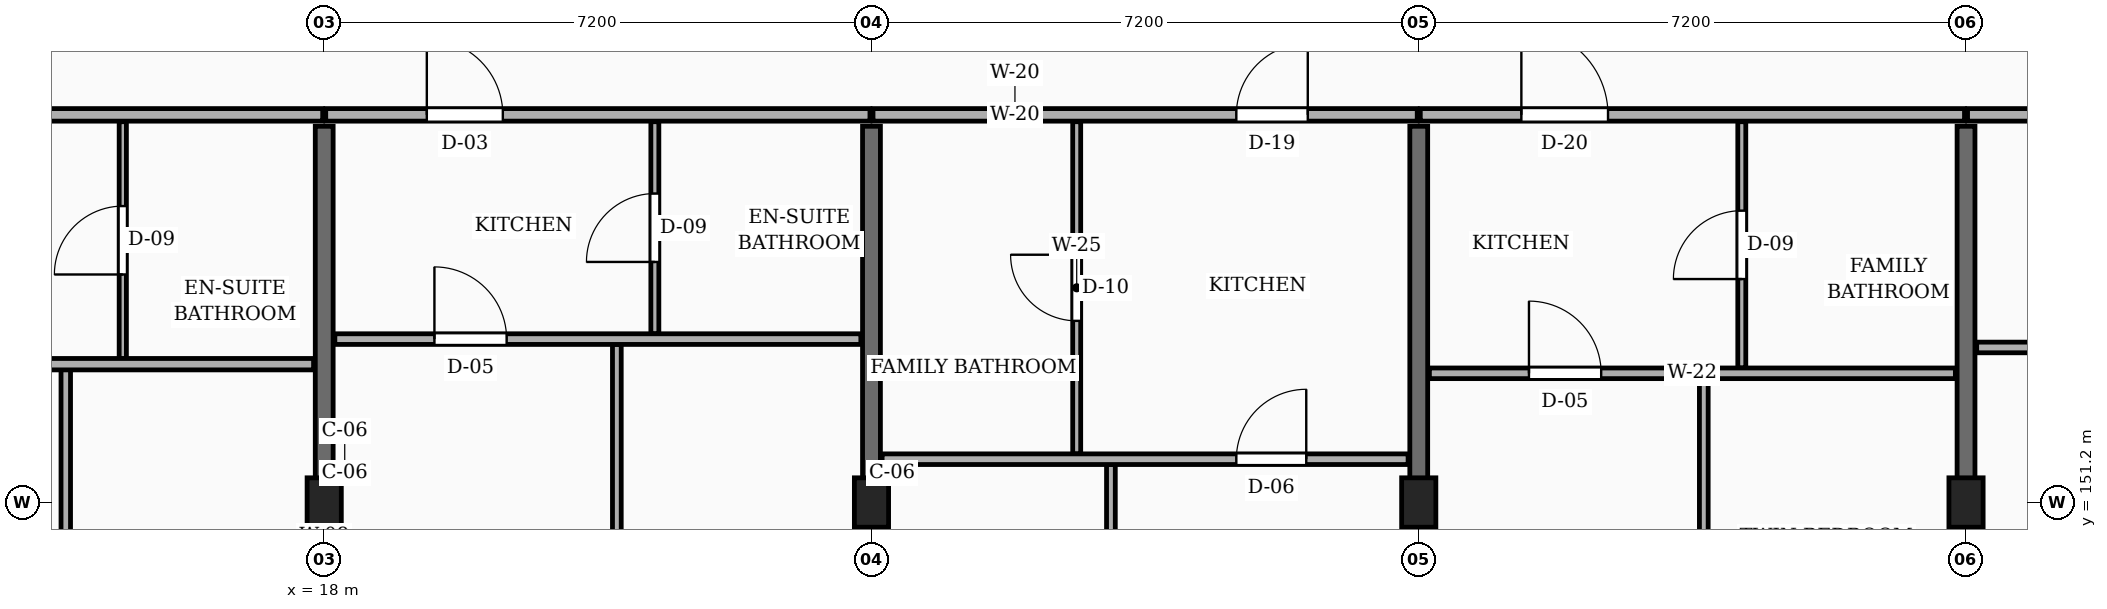
"""IFC4 building model, lengths in metres.
Left out: names, types, materials, properties, quantities, classifications, styles, units other than length and angle.
Written with IfcOpenShell. Run it as: python <this file> out.ifc"""

import sys

from ifc_helpers import new_model, si_unit, direction, frame, frame_2d, origin, origin_2d, place, context, subcontext, project, spatial, rectangle, extrude, element, fill, save


model = new_model("IFC4")
c1 = context("Model", 3, precision=1e-05, world=origin(), true_north=direction((0.0, 1.0)))
c2 = subcontext(c1, "Body", "Model", "MODEL_VIEW")
j1 = project(units=[si_unit("LENGTHUNIT", "METRE"), si_unit("PLANEANGLEUNIT", "RADIAN")], contexts=[c1])
p1 = place(None, origin())
s1 = spatial("IfcSite", under=j1, at=p1, CompositionType="ELEMENT")
p2 = place(p1, origin())
s2 = spatial("IfcBuilding", under=s1, at=p2, CompositionType="ELEMENT")
p3 = place(p2, frame((0.0, 0.0, 13.95)))
s3 = spatial("IfcBuildingStorey", under=s2, at=p3, CompositionType="ELEMENT", Elevation=13.95)
for number, where, z_axis, x_axis in (
    (1, (18.0, 151.2, 0.0), (0.0, 0.0, 1.0), (1.0, 0.0, 0.0)),
    (2, (25.2, 151.2, 0.0), (0.0, 0.0, 1.0), (1.0, 0.0, 0.0)),
    (3, (32.4, 151.2, 0.0), (0.0, 0.0, 1.0), (1.0, 0.0, 0.0)),
    (4, (39.6, 151.2, 0.0), (0.0, 0.0, 1.0), (1.0, 0.0, 0.0)),
):
    element("IfcColumn", number, at=place(p3, frame(where, z_axis=z_axis, x_axis=x_axis)), inside=s3, PredefinedType="COLUMN", context=c2, shape_type="SweptSolid", body=[
        extrude(rectangle(XDim=0.45, YDim=0.65, at=origin_2d()), origin(), (0.0, 0.0, 1.0), 3.15),
    ])
for number, where, z_axis, x_axis in (
    (5, (18.0, 144.275, 0.0), (0.0, 0.0, 1.0), (0.0, 1.0, 0.0)),
    (6, (25.2, 144.275, 0.0), (0.0, 0.0, 1.0), (0.0, 1.0, 0.0)),
    (7, (32.4, 144.275, 0.0), (0.0, 0.0, 1.0), (0.0, 1.0, 0.0)),
    (8, (39.6, 144.275, 0.0), (0.0, 0.0, 1.0), (0.0, 1.0, 0.0)),
):
    element("IfcWall", number, at=place(p3, frame(where, z_axis=z_axis, x_axis=x_axis)), inside=s3, PredefinedType="SOLIDWALL", context=c2, shape_type="SweptSolid", body=[
        extrude(rectangle(XDim=11.875, YDim=0.235, at=frame_2d((5.938, 0.0))), origin(), (0.0, 0.0, 1.0), 2.185),
    ])
p4 = place(p3, frame((10.975, 156.3, 0.0), z_axis=(0.0, 0.0, 1.0), x_axis=(1.0, 0.0, 0.0)))
e9 = element("IfcWall", 9, at=p4, inside=s3, PredefinedType="PARTITIONING", context=c2, shape_type="SweptSolid", body=[
    extrude(rectangle(XDim=7.005, YDim=0.165, at=frame_2d((3.502, 0.0))), origin(), (0.0, 0.0, 1.0), 2.32),
])
p5 = place(p4, frame((1.175, 0.0, 0.0)))
e10 = element("IfcOpeningElement", 10, at=p5, cuts=e9, PredefinedType="OPENING", context=c2, shape_type="SweptSolid", body=[
    extrude(rectangle(XDim=1.14, YDim=2.18, at=frame_2d((0.57, 1.09))), frame((0.0, 0.093, 0.0), z_axis=(0.0, -1.0, 0.0), x_axis=(1.0, 0.0, 0.0)), (0.0, 0.0, 1.0), 0.185),
])
p6 = place(p3, frame((18.02, 156.3, 0.0), z_axis=(0.0, 0.0, 1.0), x_axis=(1.0, 0.0, 0.0)))
e11 = element("IfcWall", 11, at=p6, inside=s3, PredefinedType="PARTITIONING", context=c2, shape_type="SweptSolid", body=[
    extrude(rectangle(XDim=7.16, YDim=0.165, at=frame_2d((3.58, 0.0))), origin(), (0.0, 0.0, 1.0), 2.32),
])
p7 = place(p6, frame((1.33, 0.0, 0.0)))
e12 = element("IfcOpeningElement", 12, at=p7, cuts=e11, PredefinedType="OPENING", context=c2, shape_type="SweptSolid", body=[
    extrude(rectangle(XDim=1.0, YDim=2.15, at=frame_2d((0.5, 1.075))), frame((0.0, 0.093, 0.0), z_axis=(0.0, -1.0, 0.0), x_axis=(1.0, 0.0, 0.0)), (0.0, 0.0, 1.0), 0.185),
])
p8 = place(p3, frame((25.22, 156.3, 0.0), z_axis=(0.0, 0.0, 1.0), x_axis=(1.0, 0.0, 0.0)))
e13 = element("IfcWall", 13, at=p8, inside=s3, PredefinedType="PARTITIONING", context=c2, shape_type="SweptSolid", body=[
    extrude(rectangle(XDim=7.16, YDim=0.165, at=frame_2d((3.58, 0.0))), origin(), (0.0, 0.0, 1.0), 2.32),
])
p9 = place(p8, frame((4.78, 0.0, 0.0)))
e14 = element("IfcOpeningElement", 14, at=p9, cuts=e13, PredefinedType="OPENING", context=c2, shape_type="SweptSolid", body=[
    extrude(rectangle(XDim=0.94, YDim=2.12, at=frame_2d((0.47, 1.06))), frame((0.0, 0.093, 0.0), z_axis=(0.0, -1.0, 0.0), x_axis=(1.0, 0.0, 0.0)), (0.0, 0.0, 1.0), 0.185),
])
p10 = place(p3, frame((32.42, 156.3, 0.0), z_axis=(0.0, 0.0, 1.0), x_axis=(1.0, 0.0, 0.0)))
e15 = element("IfcWall", 15, at=p10, inside=s3, PredefinedType="PARTITIONING", context=c2, shape_type="SweptSolid", body=[
    extrude(rectangle(XDim=7.16, YDim=0.165, at=frame_2d((3.58, 0.0))), origin(), (0.0, 0.0, 1.0), 2.32),
])
p11 = place(p10, frame((1.33, 0.0, 0.0)))
e16 = element("IfcOpeningElement", 16, at=p11, cuts=e15, PredefinedType="OPENING", context=c2, shape_type="SweptSolid", body=[
    extrude(rectangle(XDim=1.14, YDim=2.18, at=frame_2d((0.57, 1.09))), frame((0.0, 0.093, 0.0), z_axis=(0.0, -1.0, 0.0), x_axis=(1.0, 0.0, 0.0)), (0.0, 0.0, 1.0), 0.185),
])
p12 = place(p3, frame((39.62, 156.3, 0.0), z_axis=(0.0, 0.0, 1.0), x_axis=(1.0, 0.0, 0.0)))
e17 = element("IfcWall", 17, at=p12, inside=s3, PredefinedType="PARTITIONING", context=c2, shape_type="SweptSolid", body=[
    extrude(rectangle(XDim=7.16, YDim=0.165, at=frame_2d((3.58, 0.0))), origin(), (0.0, 0.0, 1.0), 2.32),
])
p13 = place(p12, frame((1.33, 0.0, 0.0)))
e18 = element("IfcOpeningElement", 18, at=p13, cuts=e17, PredefinedType="OPENING", context=c2, shape_type="SweptSolid", body=[
    extrude(rectangle(XDim=1.0, YDim=2.15, at=frame_2d((0.5, 1.075))), frame((0.0, 0.093, 0.0), z_axis=(0.0, -1.0, 0.0), x_axis=(1.0, 0.0, 0.0)), (0.0, 0.0, 1.0), 0.185),
])
p14 = place(p3, frame((14.6, 144.175, 0.0), z_axis=(0.0, 0.0, 1.0), x_axis=(0.0, 1.0, 0.0)))
e19 = element("IfcWall", 19, at=p14, inside=s3, PredefinedType="PARTITIONING", context=c2, shape_type="SweptSolid", body=[
    extrude(rectangle(XDim=8.775, YDim=0.125, at=frame_2d((4.387, 0.0))), origin(), (0.0, 0.0, 1.0), 2.32),
])
p15 = place(p14, frame((3.938, 0.0, 0.0)))
e20 = element("IfcOpeningElement", 20, at=p15, cuts=e19, PredefinedType="OPENING", context=c2, shape_type="SweptSolid", body=[
    extrude(rectangle(XDim=0.9, YDim=2.1, at=frame_2d((0.45, 1.05))), frame((0.0, 0.073, 0.0), z_axis=(0.0, -1.0, 0.0), x_axis=(1.0, 0.0, 0.0)), (0.0, 0.0, 1.0), 0.145),
])
p16 = place(p3, frame((15.35, 153.09, 0.0), z_axis=(0.0, 0.0, 1.0), x_axis=(0.0, 1.0, 0.0)))
e21 = element("IfcWall", 21, at=p16, inside=s3, PredefinedType="PARTITIONING", context=c2, shape_type="SweptSolid", body=[
    extrude(rectangle(XDim=3.12, YDim=0.095, at=frame_2d((1.56, 0.0))), origin(), (0.0, 0.0, 1.0), 2.32),
])
p17 = place(p16, frame((1.11, 0.0, 0.0)))
e22 = element("IfcOpeningElement", 22, at=p17, cuts=e21, PredefinedType="OPENING", context=c2, shape_type="SweptSolid", body=[
    extrude(rectangle(XDim=0.9, YDim=2.05, at=frame_2d((0.45, 1.025))), frame((0.0, 0.058, 0.0), z_axis=(0.0, -1.0, 0.0), x_axis=(1.0, 0.0, 0.0)), (0.0, 0.0, 1.0), 0.115),
])
p18 = place(p3, frame((10.975, 153.02, 0.0), z_axis=(0.0, 0.0, 1.0), x_axis=(1.0, 0.0, 0.0)))
e23 = element("IfcWall", 23, at=p18, inside=s3, PredefinedType="PARTITIONING", context=c2, shape_type="SweptSolid", body=[
    extrude(rectangle(XDim=6.885, YDim=0.15, at=frame_2d((3.442, 0.0))), origin(), (0.0, 0.0, 1.0), 2.32),
])
p19 = place(p18, frame((1.275, 0.0, 0.0)))
e24 = element("IfcOpeningElement", 24, at=p19, cuts=e23, PredefinedType="OPENING", context=c2, shape_type="SweptSolid", body=[
    extrude(rectangle(XDim=0.95, YDim=2.1, at=frame_2d((0.475, 1.05))), frame((0.0, 0.085, 0.0), z_axis=(0.0, -1.0, 0.0), x_axis=(1.0, 0.0, 0.0)), (0.0, 0.0, 1.0), 0.17),
])
p20 = place(p3, frame((21.85, 144.175, 0.0), z_axis=(0.0, 0.0, 1.0), x_axis=(0.0, 1.0, 0.0)))
e25 = element("IfcWall", 25, at=p20, inside=s3, PredefinedType="PARTITIONING", context=c2, shape_type="SweptSolid", body=[
    extrude(rectangle(XDim=9.105, YDim=0.115, at=frame_2d((4.552, 0.0))), origin(), (0.0, 0.0, 1.0), 2.32),
])
p21 = place(p20, frame((4.103, 0.0, 0.0)))
e26 = element("IfcOpeningElement", 26, at=p21, cuts=e25, PredefinedType="OPENING", context=c2, shape_type="SweptSolid", body=[
    extrude(rectangle(XDim=0.9, YDim=2.1, at=frame_2d((0.45, 1.05))), frame((0.0, 0.067, 0.0), z_axis=(0.0, -1.0, 0.0), x_axis=(1.0, 0.0, 0.0)), (0.0, 0.0, 1.0), 0.135),
])
p22 = place(p3, frame((22.35, 153.42, 0.0), z_axis=(0.0, 0.0, 1.0), x_axis=(0.0, 1.0, 0.0)))
e27 = element("IfcWall", 27, at=p22, inside=s3, PredefinedType="PARTITIONING", context=c2, shape_type="SweptSolid", body=[
    extrude(rectangle(XDim=2.79, YDim=0.105, at=frame_2d((1.395, 0.0))), origin(), (0.0, 0.0, 1.0), 2.32),
])
p23 = place(p22, frame((0.945, 0.0, 0.0)))
e28 = element("IfcOpeningElement", 28, at=p23, cuts=e27, PredefinedType="OPENING", context=c2, shape_type="SweptSolid", body=[
    extrude(rectangle(XDim=0.9, YDim=2.05, at=frame_2d((0.45, 1.025))), frame((0.0, 0.062, 0.0), z_axis=(0.0, -1.0, 0.0), x_axis=(1.0, 0.0, 0.0)), (0.0, 0.0, 1.0), 0.125),
])
p24 = place(p3, frame((18.14, 153.35, 0.0), z_axis=(0.0, 0.0, 1.0), x_axis=(1.0, 0.0, 0.0)))
e29 = element("IfcWall", 29, at=p24, inside=s3, PredefinedType="PARTITIONING", context=c2, shape_type="SweptSolid", body=[
    extrude(rectangle(XDim=6.92, YDim=0.14, at=frame_2d((3.46, 0.0))), origin(), (0.0, 0.0, 1.0), 2.32),
])
p25 = place(p24, frame((1.31, 0.0, 0.0)))
e30 = element("IfcOpeningElement", 30, at=p25, cuts=e29, PredefinedType="OPENING", context=c2, shape_type="SweptSolid", body=[
    extrude(rectangle(XDim=0.95, YDim=2.1, at=frame_2d((0.475, 1.05))), frame((0.0, 0.08, 0.0), z_axis=(0.0, -1.0, 0.0), x_axis=(1.0, 0.0, 0.0)), (0.0, 0.0, 1.0), 0.16),
])
p26 = place(p3, frame((28.35, 144.175, 0.0), z_axis=(0.0, 0.0, 1.0), x_axis=(0.0, 1.0, 0.0)))
e31 = element("IfcWall", 31, at=p26, inside=s3, PredefinedType="PARTITIONING", context=c2, shape_type="SweptSolid", body=[
    extrude(rectangle(XDim=7.525, YDim=0.115, at=frame_2d((3.762, 0.0))), origin(), (0.0, 0.0, 1.0), 2.32),
])
p27 = place(p26, frame((3.323, 0.0, 0.0)))
e32 = element("IfcOpeningElement", 32, at=p27, cuts=e31, PredefinedType="OPENING", context=c2, shape_type="SweptSolid", body=[
    extrude(rectangle(XDim=0.88, YDim=2.08, at=frame_2d((0.44, 1.04))), frame((0.0, 0.067, 0.0), z_axis=(0.0, -1.0, 0.0), x_axis=(1.0, 0.0, 0.0)), (0.0, 0.0, 1.0), 0.135),
])
p28 = place(p3, frame((27.9, 151.84, 0.0), z_axis=(0.0, 0.0, 1.0), x_axis=(0.0, 1.0, 0.0)))
e33 = element("IfcWall", 33, at=p28, inside=s3, PredefinedType="PARTITIONING", context=c2, shape_type="SweptSolid", body=[
    extrude(rectangle(XDim=4.37, YDim=0.105, at=frame_2d((2.185, 0.0))), origin(), (0.0, 0.0, 1.0), 2.32),
])
p29 = place(p28, frame((1.75, 0.0, 0.0)))
e34 = element("IfcOpeningElement", 34, at=p29, cuts=e33, PredefinedType="OPENING", context=c2, shape_type="SweptSolid", body=[
    extrude(rectangle(XDim=0.87, YDim=2.05, at=frame_2d((0.435, 1.025))), frame((0.0, 0.062, 0.0), z_axis=(0.0, -1.0, 0.0), x_axis=(1.0, 0.0, 0.0)), (0.0, 0.0, 1.0), 0.125),
])
p30 = place(p3, frame((25.34, 151.77, 0.0), z_axis=(0.0, 0.0, 1.0), x_axis=(1.0, 0.0, 0.0)))
e35 = element("IfcWall", 35, at=p30, inside=s3, PredefinedType="PARTITIONING", context=c2, shape_type="SweptSolid", body=[
    extrude(rectangle(XDim=6.92, YDim=0.14, at=frame_2d((3.46, 0.0))), origin(), (0.0, 0.0, 1.0), 2.32),
])
p31 = place(p30, frame((4.66, 0.0, 0.0)))
e36 = element("IfcOpeningElement", 36, at=p31, cuts=e35, PredefinedType="OPENING", context=c2, shape_type="SweptSolid", body=[
    extrude(rectangle(XDim=0.92, YDim=2.1, at=frame_2d((0.46, 1.05))), frame((0.0, 0.08, 0.0), z_axis=(0.0, -1.0, 0.0), x_axis=(1.0, 0.0, 0.0)), (0.0, 0.0, 1.0), 0.16),
])
p32 = place(p3, frame((36.15, 144.175, 0.0), z_axis=(0.0, 0.0, 1.0), x_axis=(0.0, 1.0, 0.0)))
e37 = element("IfcWall", 37, at=p32, inside=s3, PredefinedType="PARTITIONING", context=c2, shape_type="SweptSolid", body=[
    extrude(rectangle(XDim=8.655, YDim=0.115, at=frame_2d((4.328, 0.0))), origin(), (0.0, 0.0, 1.0), 2.32),
])
p33 = place(p32, frame((3.877, 0.0, 0.0)))
e38 = element("IfcOpeningElement", 38, at=p33, cuts=e37, PredefinedType="OPENING", context=c2, shape_type="SweptSolid", body=[
    extrude(rectangle(XDim=0.9, YDim=2.1, at=frame_2d((0.45, 1.05))), frame((0.0, 0.067, 0.0), z_axis=(0.0, -1.0, 0.0), x_axis=(1.0, 0.0, 0.0)), (0.0, 0.0, 1.0), 0.135),
])
p34 = place(p3, frame((36.65, 152.97, 0.0), z_axis=(0.0, 0.0, 1.0), x_axis=(0.0, 1.0, 0.0)))
e39 = element("IfcWall", 39, at=p34, inside=s3, PredefinedType="PARTITIONING", context=c2, shape_type="SweptSolid", body=[
    extrude(rectangle(XDim=3.24, YDim=0.105, at=frame_2d((1.62, 0.0))), origin(), (0.0, 0.0, 1.0), 2.32),
])
p35 = place(p34, frame((1.17, 0.0, 0.0)))
e40 = element("IfcOpeningElement", 40, at=p35, cuts=e39, PredefinedType="OPENING", context=c2, shape_type="SweptSolid", body=[
    extrude(rectangle(XDim=0.9, YDim=2.05, at=frame_2d((0.45, 1.025))), frame((0.0, 0.062, 0.0), z_axis=(0.0, -1.0, 0.0), x_axis=(1.0, 0.0, 0.0)), (0.0, 0.0, 1.0), 0.125),
])
p36 = place(p3, frame((32.54, 152.9, 0.0), z_axis=(0.0, 0.0, 1.0), x_axis=(1.0, 0.0, 0.0)))
e41 = element("IfcWall", 41, at=p36, inside=s3, PredefinedType="PARTITIONING", context=c2, shape_type="SweptSolid", body=[
    extrude(rectangle(XDim=6.92, YDim=0.14, at=frame_2d((3.46, 0.0))), origin(), (0.0, 0.0, 1.0), 2.32),
])
p37 = place(p36, frame((1.31, 0.0, 0.0)))
e42 = element("IfcOpeningElement", 42, at=p37, cuts=e41, PredefinedType="OPENING", context=c2, shape_type="SweptSolid", body=[
    extrude(rectangle(XDim=0.95, YDim=2.1, at=frame_2d((0.475, 1.05))), frame((0.0, 0.08, 0.0), z_axis=(0.0, -1.0, 0.0), x_axis=(1.0, 0.0, 0.0)), (0.0, 0.0, 1.0), 0.16),
])
p38 = place(p3, frame((39.74, 153.24, 0.0), z_axis=(0.0, 0.0, 1.0), x_axis=(1.0, 0.0, 0.0)))
e43 = element("IfcWall", 43, at=p38, inside=s3, PredefinedType="PARTITIONING", context=c2, shape_type="SweptSolid", body=[
    extrude(rectangle(XDim=6.92, YDim=0.14, at=frame_2d((3.46, 0.0))), origin(), (0.0, 0.0, 1.0), 2.32),
])
p39 = place(p38, frame((1.31, 0.0, 0.0)))
e44 = element("IfcOpeningElement", 44, at=p39, cuts=e43, PredefinedType="OPENING", context=c2, shape_type="SweptSolid", body=[
    extrude(rectangle(XDim=0.92, YDim=2.1, at=frame_2d((0.46, 1.05))), frame((0.0, 0.08, 0.0), z_axis=(0.0, -1.0, 0.0), x_axis=(1.0, 0.0, 0.0)), (0.0, 0.0, 1.0), 0.16),
])
p40 = place(p7, origin())
e45 = element("IfcDoor", 45, at=p40, inside=s3, OperationType="SINGLE_SWING_LEFT", PredefinedType="DOOR", context=c2, shape_type="SweptSolid", body=[
    extrude(rectangle(XDim=1.0, YDim=2.15, at=frame_2d((0.5, 1.075))), frame((0.0, 0.025, 0.0), z_axis=(0.0, -1.0, 0.0), x_axis=(1.0, 0.0, 0.0)), (0.0, 0.0, 1.0), 0.05),
])
fill(e12, e45)
p41 = place(p9, origin())
e46 = element("IfcDoor", 46, at=p41, inside=s3, OperationType="SINGLE_SWING_RIGHT", PredefinedType="DOOR", context=c2, shape_type="SweptSolid", body=[
    extrude(rectangle(XDim=0.94, YDim=2.12, at=frame_2d((0.47, 1.06))), frame((0.0, 0.025, 0.0), z_axis=(0.0, -1.0, 0.0), x_axis=(1.0, 0.0, 0.0)), (0.0, 0.0, 1.0), 0.05),
])
fill(e14, e46)
p42 = place(p11, origin())
e47 = element("IfcDoor", 47, at=p42, inside=s3, OperationType="SINGLE_SWING_LEFT", PredefinedType="DOOR", context=c2, shape_type="SweptSolid", body=[
    extrude(rectangle(XDim=1.14, YDim=2.18, at=frame_2d((0.57, 1.09))), frame((0.0, 0.025, 0.0), z_axis=(0.0, -1.0, 0.0), x_axis=(1.0, 0.0, 0.0)), (0.0, 0.0, 1.0), 0.05),
])
fill(e16, e47)
p43 = place(p17, origin())
e48 = element("IfcDoor", 48, at=p43, inside=s3, OperationType="SINGLE_SWING_LEFT", PredefinedType="DOOR", context=c2, shape_type="SweptSolid", body=[
    extrude(rectangle(XDim=0.9, YDim=2.05, at=frame_2d((0.45, 1.025))), frame((0.0, 0.025, 0.0), z_axis=(0.0, -1.0, 0.0), x_axis=(1.0, 0.0, 0.0)), (0.0, 0.0, 1.0), 0.05),
])
fill(e22, e48)
p44 = place(p23, origin())
e49 = element("IfcDoor", 49, at=p44, inside=s3, OperationType="SINGLE_SWING_LEFT", PredefinedType="DOOR", context=c2, shape_type="SweptSolid", body=[
    extrude(rectangle(XDim=0.9, YDim=2.05, at=frame_2d((0.45, 1.025))), frame((0.0, 0.025, 0.0), z_axis=(0.0, -1.0, 0.0), x_axis=(1.0, 0.0, 0.0)), (0.0, 0.0, 1.0), 0.05),
])
fill(e28, e49)
p45 = place(p25, origin())
e50 = element("IfcDoor", 50, at=p45, inside=s3, OperationType="SINGLE_SWING_LEFT", PredefinedType="DOOR", context=c2, shape_type="SweptSolid", body=[
    extrude(rectangle(XDim=0.95, YDim=2.1, at=frame_2d((0.475, 1.05))), frame((0.0, 0.025, 0.0), z_axis=(0.0, -1.0, 0.0), x_axis=(1.0, 0.0, 0.0)), (0.0, 0.0, 1.0), 0.05),
])
fill(e30, e50)
p46 = place(p29, origin())
e51 = element("IfcDoor", 51, at=p46, inside=s3, OperationType="SINGLE_SWING_RIGHT", PredefinedType="DOOR", context=c2, shape_type="SweptSolid", body=[
    extrude(rectangle(XDim=0.87, YDim=2.05, at=frame_2d((0.435, 1.025))), frame((0.0, 0.025, 0.0), z_axis=(0.0, -1.0, 0.0), x_axis=(1.0, 0.0, 0.0)), (0.0, 0.0, 1.0), 0.05),
])
fill(e34, e51)
p47 = place(p31, origin())
e52 = element("IfcDoor", 52, at=p47, inside=s3, OperationType="SINGLE_SWING_RIGHT", PredefinedType="DOOR", context=c2, shape_type="SweptSolid", body=[
    extrude(rectangle(XDim=0.92, YDim=2.1, at=frame_2d((0.46, 1.05))), frame((0.0, 0.025, 0.0), z_axis=(0.0, -1.0, 0.0), x_axis=(1.0, 0.0, 0.0)), (0.0, 0.0, 1.0), 0.05),
])
fill(e36, e52)
p48 = place(p35, origin())
e53 = element("IfcDoor", 53, at=p48, inside=s3, OperationType="SINGLE_SWING_LEFT", PredefinedType="DOOR", context=c2, shape_type="SweptSolid", body=[
    extrude(rectangle(XDim=0.9, YDim=2.05, at=frame_2d((0.45, 1.025))), frame((0.0, 0.025, 0.0), z_axis=(0.0, -1.0, 0.0), x_axis=(1.0, 0.0, 0.0)), (0.0, 0.0, 1.0), 0.05),
])
fill(e40, e53)
p49 = place(p37, origin())
e54 = element("IfcDoor", 54, at=p49, inside=s3, OperationType="SINGLE_SWING_LEFT", PredefinedType="DOOR", context=c2, shape_type="SweptSolid", body=[
    extrude(rectangle(XDim=0.95, YDim=2.1, at=frame_2d((0.475, 1.05))), frame((0.0, 0.025, 0.0), z_axis=(0.0, -1.0, 0.0), x_axis=(1.0, 0.0, 0.0)), (0.0, 0.0, 1.0), 0.05),
])
fill(e42, e54)
save(model, sys.argv[1])
